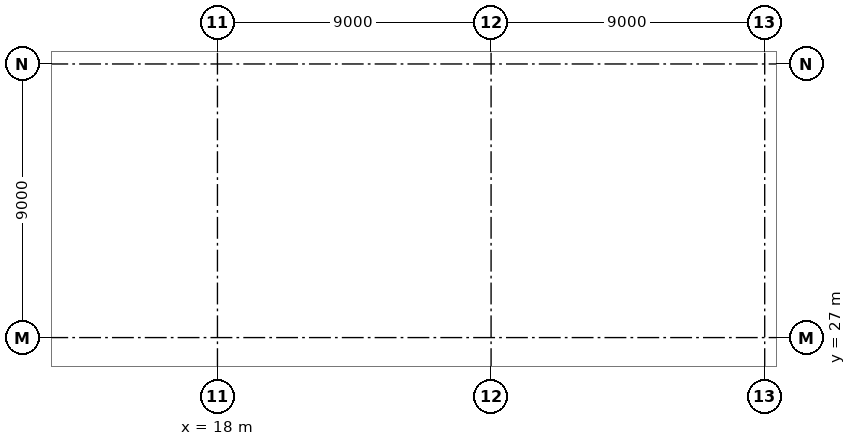
"""IFC4 building model, lengths in metres.
Left out: names, types, materials, properties, quantities, classifications, styles, units other than length and angle.
Written with IfcOpenShell. Run it as: python <this file> out.ifc"""

import sys

from ifc_helpers import new_model, si_unit, direction, frame, frame_2d, origin, origin_2d, place, context, subcontext, project, spatial, rectangle, extrude, element, fill, save


model = new_model("IFC4")
c1 = context("Model", 3, precision=1e-05, world=origin(), true_north=direction((0.0, 1.0)))
c2 = subcontext(c1, "Body", "Model", "MODEL_VIEW")
j1 = project(units=[si_unit("LENGTHUNIT", "METRE"), si_unit("PLANEANGLEUNIT", "RADIAN")], contexts=[c1])
p1 = place(None, origin())
s1 = spatial("IfcSite", under=j1, at=p1, CompositionType="ELEMENT")
p2 = place(p1, origin())
s2 = spatial("IfcBuilding", under=s1, at=p2, CompositionType="ELEMENT")
p3 = place(p2, origin())
s3 = spatial("IfcBuildingStorey", under=s2, at=p3, CompositionType="ELEMENT", Elevation=0.0)
p4 = place(p3, frame((18.0, 34.6, 0.0), z_axis=(0.0, 0.0, 1.0), x_axis=(1.0, 0.0, 0.0)))
e1 = element("IfcColumn", 1, at=p4, inside=s3, PredefinedType="COLUMN", context=c2, shape_type="SweptSolid", body=[
    extrude(rectangle(XDim=0.625, YDim=0.625, at=origin_2d()), origin(), (0.0, 0.0, 1.0), 4.5),
])
p5 = place(p3, frame((27.0, 27.0, 0.0), z_axis=(0.0, 0.0, 1.0), x_axis=(1.0, 0.0, 0.0)))
e2 = element("IfcColumn", 2, at=p5, inside=s3, PredefinedType="COLUMN", context=c2, shape_type="SweptSolid", body=[
    extrude(rectangle(XDim=0.875, YDim=0.875, at=origin_2d()), origin(), (0.0, 0.0, 1.0), 4.5),
])
p6 = place(p3, frame((27.0, 34.6, 0.0), z_axis=(0.0, 0.0, 1.0), x_axis=(1.0, 0.0, 0.0)))
e3 = element("IfcColumn", 3, at=p6, inside=s3, PredefinedType="COLUMN", context=c2, shape_type="SweptSolid", body=[
    extrude(rectangle(XDim=0.575, YDim=0.575, at=origin_2d()), origin(), (0.0, 0.0, 1.0), 4.5),
])
p7 = place(p3, frame((34.6, 27.0, 0.0), z_axis=(0.0, 0.0, 1.0), x_axis=(1.0, 0.0, 0.0)))
e4 = element("IfcColumn", 4, at=p7, inside=s3, PredefinedType="COLUMN", context=c2, shape_type="SweptSolid", body=[
    extrude(rectangle(XDim=0.6, YDim=0.6, at=origin_2d()), origin(), (0.0, 0.0, 1.0), 4.5),
])
p8 = place(p3, frame((13.45, 27.0, 0.0), z_axis=(0.0, 0.0, 1.0), x_axis=(1.0, 0.0, 0.0)))
e5 = element("IfcWall", 5, at=p8, inside=s3, PredefinedType="PARTITIONING", context=c2, shape_type="SweptSolid", body=[
    extrude(rectangle(XDim=4.625, YDim=0.1, at=frame_2d((2.312, 0.0))), origin(), (0.0, 0.0, 1.0), 4.1),
])
p9 = place(p3, frame((27.5, 27.0, 0.0), z_axis=(0.0, 0.0, 1.0), x_axis=(1.0, 0.0, 0.0)))
e6 = element("IfcWall", 6, at=p9, inside=s3, PredefinedType="PARTITIONING", context=c2, shape_type="SweptSolid", body=[
    extrude(rectangle(XDim=6.6, YDim=0.1, at=frame_2d((3.3, 0.0))), origin(), (0.0, 0.0, 1.0), 4.1),
])
p10 = place(p9, frame((3.3, 0.0, 0.0)))
e7 = element("IfcOpeningElement", 7, at=p10, cuts=e6, PredefinedType="OPENING", context=c2, shape_type="SweptSolid", body=[
    extrude(rectangle(XDim=0.9, YDim=2.1, at=frame_2d((0.45, 1.05))), frame((0.0, 0.06, 0.0), z_axis=(0.0, -1.0, 0.0), x_axis=(1.0, 0.0, 0.0)), (0.0, 0.0, 1.0), 0.12),
])
p11 = place(p9, frame((5.3, 0.0, 0.0)))
e8 = element("IfcOpeningElement", 8, at=p11, cuts=e6, PredefinedType="OPENING", context=c2, shape_type="SweptSolid", body=[
    extrude(rectangle(XDim=0.9, YDim=2.1, at=frame_2d((0.45, 1.05))), frame((0.0, 0.06, 0.0), z_axis=(0.0, -1.0, 0.0), x_axis=(1.0, 0.0, 0.0)), (0.0, 0.0, 1.0), 0.12),
])
p12 = place(p3, frame((35.1, 27.0, 0.0), z_axis=(0.0, 0.0, 1.0), x_axis=(1.0, 0.0, 0.0)))
e9 = element("IfcWall", 9, at=p12, inside=s3, PredefinedType="PARTITIONING", context=c2, shape_type="SweptSolid", body=[
    extrude(rectangle(XDim=0.9, YDim=0.1, at=frame_2d((0.45, 0.0))), origin(), (0.0, 0.0, 1.0), 4.1),
])
p13 = place(p3, frame((17.925, 31.5, 0.0), z_axis=(0.0, 0.0, 1.0), x_axis=(1.0, 0.0, 0.0)))
e10 = element("IfcWall", 10, at=p13, inside=s3, PredefinedType="PARTITIONING", context=c2, shape_type="SweptSolid", body=[
    extrude(rectangle(XDim=9.15, YDim=0.2, at=frame_2d((4.575, 0.0))), origin(), (0.0, 0.0, 1.0), 4.1),
])
p14 = place(p13, frame((7.075, 0.0, 0.0)))
e11 = element("IfcOpeningElement", 11, at=p14, cuts=e10, PredefinedType="OPENING", context=c2, shape_type="SweptSolid", body=[
    extrude(rectangle(XDim=1.2, YDim=2.1, at=frame_2d((0.6, 1.05))), frame((0.0, 0.11, 0.0), z_axis=(0.0, -1.0, 0.0), x_axis=(1.0, 0.0, 0.0)), (0.0, 0.0, 1.0), 0.22),
])
p15 = place(p3, frame((13.5, 27.05, 0.0), z_axis=(0.0, 0.0, 1.0), x_axis=(0.0, 1.0, 0.0)))
e12 = element("IfcWall", 12, at=p15, inside=s3, PredefinedType="PARTITIONING", context=c2, shape_type="SweptSolid", body=[
    extrude(rectangle(XDim=8.95, YDim=0.1, at=frame_2d((4.475, 0.0))), origin(), (0.0, 0.0, 1.0), 4.1),
])
p16 = place(p15, frame((3.55, 0.0, 0.0)))
e13 = element("IfcOpeningElement", 13, at=p16, cuts=e12, PredefinedType="OPENING", context=c2, shape_type="SweptSolid", body=[
    extrude(rectangle(XDim=1.8, YDim=2.1, at=frame_2d((0.9, 1.05))), frame((0.0, 0.06, 0.0), z_axis=(0.0, -1.0, 0.0), x_axis=(1.0, 0.0, 0.0)), (0.0, 0.0, 1.0), 0.12),
])
p17 = place(p3, frame((18.0, 27.05, 0.0), z_axis=(0.0, 0.0, 1.0), x_axis=(0.0, 1.0, 0.0)))
e14 = element("IfcWall", 14, at=p17, inside=s3, PredefinedType="PARTITIONING", context=c2, shape_type="SweptSolid", body=[
    extrude(rectangle(XDim=4.35, YDim=0.15, at=frame_2d((2.175, 0.0))), origin(), (0.0, 0.0, 1.0), 4.1),
])
p18 = place(p3, frame((18.0, 31.6, 0.0), z_axis=(0.0, 0.0, 1.0), x_axis=(0.0, 1.0, 0.0)))
e15 = element("IfcWall", 15, at=p18, inside=s3, PredefinedType="PARTITIONING", context=c2, shape_type="SweptSolid", body=[
    extrude(rectangle(XDim=2.688, YDim=0.2, at=frame_2d((1.344, 0.0))), origin(), (0.0, 0.0, 1.0), 4.1),
])
p19 = place(p3, frame((18.0, 34.913, 0.0), z_axis=(0.0, 0.0, 1.0), x_axis=(0.0, 1.0, 0.0)))
e16 = element("IfcWall", 16, at=p19, inside=s3, PredefinedType="PARTITIONING", context=c2, shape_type="SweptSolid", body=[
    extrude(rectangle(XDim=1.087, YDim=0.2, at=frame_2d((0.544, 0.0))), origin(), (0.0, 0.0, 1.0), 4.1),
])
p20 = place(p3, frame((27.0, 27.5, 0.0), z_axis=(0.0, 0.0, 1.0), x_axis=(0.0, 1.0, 0.0)))
e17 = element("IfcWall", 17, at=p20, inside=s3, PredefinedType="PARTITIONING", context=c2, shape_type="SweptSolid", body=[
    extrude(rectangle(XDim=3.9, YDim=0.15, at=frame_2d((1.95, 0.0))), origin(), (0.0, 0.0, 1.0), 4.1),
])
p21 = place(p20, frame((1.3, 0.0, 0.0)))
e18 = element("IfcOpeningElement", 18, at=p21, cuts=e17, PredefinedType="OPENING", context=c2, shape_type="SweptSolid", body=[
    extrude(rectangle(XDim=0.9, YDim=2.1, at=frame_2d((0.45, 1.05))), frame((0.0, 0.085, 0.0), z_axis=(0.0, -1.0, 0.0), x_axis=(1.0, 0.0, 0.0)), (0.0, 0.0, 1.0), 0.17),
])
p22 = place(p3, frame((27.0, 31.6, 0.0), z_axis=(0.0, 0.0, 1.0), x_axis=(0.0, 1.0, 0.0)))
e19 = element("IfcWall", 19, at=p22, inside=s3, PredefinedType="PARTITIONING", context=c2, shape_type="SweptSolid", body=[
    extrude(rectangle(XDim=2.712, YDim=0.2, at=frame_2d((1.356, 0.0))), origin(), (0.0, 0.0, 1.0), 4.1),
])
p23 = place(p3, frame((27.0, 34.887, 0.0), z_axis=(0.0, 0.0, 1.0), x_axis=(0.0, 1.0, 0.0)))
e20 = element("IfcWall", 20, at=p23, inside=s3, PredefinedType="PARTITIONING", context=c2, shape_type="SweptSolid", body=[
    extrude(rectangle(XDim=1.113, YDim=0.2, at=frame_2d((0.556, 0.0))), origin(), (0.0, 0.0, 1.0), 4.1),
])
for number, where, z_axis, x_axis in (
    (21, (30.0, 27.05, 0.0), (0.0, 0.0, 1.0), (0.0, 1.0, 0.0)),
    (22, (32.5, 27.05, 0.0), (0.0, 0.0, 1.0), (0.0, 1.0, 0.0)),
):
    element("IfcWall", number, at=place(p3, frame(where, z_axis=z_axis, x_axis=x_axis)), inside=s3, PredefinedType="PARTITIONING", context=c2, shape_type="SweptSolid", body=[
        extrude(rectangle(XDim=8.95, YDim=0.1, at=frame_2d((4.475, 0.0))), origin(), (0.0, 0.0, 1.0), 4.1),
    ])
p24 = place(p3, frame((35.7, 27.0, 0.0), z_axis=(0.0, 0.0, 1.0), x_axis=(0.0, 1.0, 0.0)))
e23 = element("IfcWall", 23, at=p24, inside=s3, PredefinedType="STANDARD", context=c2, shape_type="SweptSolid", body=[
    extrude(rectangle(XDim=3.876, YDim=0.6, at=frame_2d((1.938, 0.0))), origin(), (0.0, 0.0, 1.0), 4.1),
])
p25 = place(p24, frame((0.724, 0.0, 0.45)))
e24 = element("IfcOpeningElement", 24, at=p25, cuts=e23, PredefinedType="OPENING", context=c2, shape_type="SweptSolid", body=[
    extrude(rectangle(XDim=2.0, YDim=3.2, at=frame_2d((1.0, 1.6))), frame((0.0, 0.31, 0.0), z_axis=(0.0, -1.0, 0.0), x_axis=(1.0, 0.0, 0.0)), (0.0, 0.0, 1.0), 0.62),
])
p26 = place(p3, frame((35.7, 30.876, 0.0), z_axis=(0.0, 0.0, 1.0), x_axis=(-0.707106781187, 0.707106781187, 0.0)))
e25 = element("IfcWall", 25, at=p26, inside=s3, PredefinedType="STANDARD", context=c2, shape_type="SweptSolid", body=[
    extrude(rectangle(XDim=6.823, YDim=0.6, at=frame_2d((3.411, 0.0))), origin(), (0.0, 0.0, 1.0), 4.1),
])
p27 = place(p3, frame((30.876, 35.7, 0.0), z_axis=(0.0, 0.0, 1.0), x_axis=(-1.0, 0.0, 0.0)))
e26 = element("IfcWall", 26, at=p27, inside=s3, PredefinedType="STANDARD", context=c2, shape_type="SweptSolid", body=[
    extrude(rectangle(XDim=4.176, YDim=0.6, at=frame_2d((2.088, 0.0))), origin(), (0.0, 0.0, 1.0), 4.1),
])
p28 = place(p27, frame((1.152, 0.0, 0.45)))
e27 = element("IfcOpeningElement", 27, at=p28, cuts=e26, PredefinedType="OPENING", context=c2, shape_type="SweptSolid", body=[
    extrude(rectangle(XDim=2.0, YDim=3.2, at=frame_2d((1.0, 1.6))), frame((0.0, 0.31, 0.0), z_axis=(0.0, -1.0, 0.0), x_axis=(1.0, 0.0, 0.0)), (0.0, 0.0, 1.0), 0.62),
])
p29 = place(p3, frame((24.5, 35.7, 0.0), z_axis=(0.0, 0.0, 1.0), x_axis=(1.0, 0.0, 0.0)))
e28 = element("IfcWall", 28, at=p29, inside=s3, PredefinedType="STANDARD", context=c2, shape_type="SweptSolid", body=[
    extrude(rectangle(XDim=2.2, YDim=0.6, at=frame_2d((1.1, 0.0))), origin(), (0.0, 0.0, 1.0), 4.1),
])
p30 = place(p29, frame((0.5, 0.0, 0.0)))
e29 = element("IfcOpeningElement", 29, at=p30, cuts=e28, PredefinedType="OPENING", context=c2, shape_type="SweptSolid", body=[
    extrude(rectangle(XDim=1.2, YDim=2.4, at=frame_2d((0.6, 1.2))), frame((0.0, 0.31, 0.0), z_axis=(0.0, -1.0, 0.0), x_axis=(1.0, 0.0, 0.0)), (0.0, 0.0, 1.0), 0.62),
])
p31 = place(p3, frame((24.5, 35.7, 0.0), z_axis=(0.0, 0.0, 1.0), x_axis=(-1.0, 0.0, 0.0)))
e30 = element("IfcWall", 30, at=p31, inside=s3, PredefinedType="STANDARD", context=c2, shape_type="SweptSolid", body=[
    extrude(rectangle(XDim=49.0, YDim=0.6, at=frame_2d((24.5, 0.0))), origin(), (0.0, 0.0, 1.0), 4.1),
])
p32 = place(p31, frame((3.571, 0.0, 0.45)))
e31 = element("IfcOpeningElement", 31, at=p32, cuts=e30, PredefinedType="OPENING", context=c2, shape_type="SweptSolid", body=[
    extrude(rectangle(XDim=2.0, YDim=3.2, at=frame_2d((1.0, 1.6))), frame((0.0, 0.31, 0.0), z_axis=(0.0, -1.0, 0.0), x_axis=(1.0, 0.0, 0.0)), (0.0, 0.0, 1.0), 0.62),
])
p33 = place(p31, frame((8.0, 0.0, 0.45)))
e32 = element("IfcOpeningElement", 32, at=p33, cuts=e30, PredefinedType="OPENING", context=c2, shape_type="SweptSolid", body=[
    extrude(rectangle(XDim=2.0, YDim=3.2, at=frame_2d((1.0, 1.6))), frame((0.0, 0.31, 0.0), z_axis=(0.0, -1.0, 0.0), x_axis=(1.0, 0.0, 0.0)), (0.0, 0.0, 1.0), 0.62),
])
p34 = place(p31, frame((12.429, 0.0, 0.45)))
e33 = element("IfcOpeningElement", 33, at=p34, cuts=e30, PredefinedType="OPENING", context=c2, shape_type="SweptSolid", body=[
    extrude(rectangle(XDim=2.0, YDim=3.2, at=frame_2d((1.0, 1.6))), frame((0.0, 0.31, 0.0), z_axis=(0.0, -1.0, 0.0), x_axis=(1.0, 0.0, 0.0)), (0.0, 0.0, 1.0), 0.62),
])
p35 = place(p31, frame((16.857, 0.0, 0.45)))
e34 = element("IfcOpeningElement", 34, at=p35, cuts=e30, PredefinedType="OPENING", context=c2, shape_type="SweptSolid", body=[
    extrude(rectangle(XDim=2.0, YDim=3.2, at=frame_2d((1.0, 1.6))), frame((0.0, 0.31, 0.0), z_axis=(0.0, -1.0, 0.0), x_axis=(1.0, 0.0, 0.0)), (0.0, 0.0, 1.0), 0.62),
])
p36 = place(p31, frame((21.286, 0.0, 0.45)))
e35 = element("IfcOpeningElement", 35, at=p36, cuts=e30, PredefinedType="OPENING", context=c2, shape_type="SweptSolid", body=[
    extrude(rectangle(XDim=2.0, YDim=3.2, at=frame_2d((1.0, 1.6))), frame((0.0, 0.31, 0.0), z_axis=(0.0, -1.0, 0.0), x_axis=(1.0, 0.0, 0.0)), (0.0, 0.0, 1.0), 0.62),
])
p37 = place(p31, frame((25.714, 0.0, 0.45)))
e36 = element("IfcOpeningElement", 36, at=p37, cuts=e30, PredefinedType="OPENING", context=c2, shape_type="SweptSolid", body=[
    extrude(rectangle(XDim=2.0, YDim=3.2, at=frame_2d((1.0, 1.6))), frame((0.0, 0.31, 0.0), z_axis=(0.0, -1.0, 0.0), x_axis=(1.0, 0.0, 0.0)), (0.0, 0.0, 1.0), 0.62),
])
p38 = place(p31, frame((30.143, 0.0, 0.45)))
e37 = element("IfcOpeningElement", 37, at=p38, cuts=e30, PredefinedType="OPENING", context=c2, shape_type="SweptSolid", body=[
    extrude(rectangle(XDim=2.0, YDim=3.2, at=frame_2d((1.0, 1.6))), frame((0.0, 0.31, 0.0), z_axis=(0.0, -1.0, 0.0), x_axis=(1.0, 0.0, 0.0)), (0.0, 0.0, 1.0), 0.62),
])
p39 = place(p31, frame((34.571, 0.0, 0.45)))
e38 = element("IfcOpeningElement", 38, at=p39, cuts=e30, PredefinedType="OPENING", context=c2, shape_type="SweptSolid", body=[
    extrude(rectangle(XDim=2.0, YDim=3.2, at=frame_2d((1.0, 1.6))), frame((0.0, 0.31, 0.0), z_axis=(0.0, -1.0, 0.0), x_axis=(1.0, 0.0, 0.0)), (0.0, 0.0, 1.0), 0.62),
])
p40 = place(p31, frame((39.0, 0.0, 0.45)))
e39 = element("IfcOpeningElement", 39, at=p40, cuts=e30, PredefinedType="OPENING", context=c2, shape_type="SweptSolid", body=[
    extrude(rectangle(XDim=2.0, YDim=3.2, at=frame_2d((1.0, 1.6))), frame((0.0, 0.31, 0.0), z_axis=(0.0, -1.0, 0.0), x_axis=(1.0, 0.0, 0.0)), (0.0, 0.0, 1.0), 0.62),
])
p41 = place(p31, frame((43.429, 0.0, 0.45)))
e40 = element("IfcOpeningElement", 40, at=p41, cuts=e30, PredefinedType="OPENING", context=c2, shape_type="SweptSolid", body=[
    extrude(rectangle(XDim=2.0, YDim=3.2, at=frame_2d((1.0, 1.6))), frame((0.0, 0.31, 0.0), z_axis=(0.0, -1.0, 0.0), x_axis=(1.0, 0.0, 0.0)), (0.0, 0.0, 1.0), 0.62),
])
p42 = place(p14, frame((1.2, 0.0, 0.0), z_axis=(0.0, 0.0, 1.0), x_axis=(-1.0, 0.0, 0.0)))
e41 = element("IfcDoor", 41, at=p42, inside=s3, OperationType="SINGLE_SWING_RIGHT", PredefinedType="DOOR", context=c2, shape_type="SweptSolid", body=[
    extrude(rectangle(XDim=1.2, YDim=2.1, at=frame_2d((0.6, 1.05))), frame((0.0, 0.025, 0.0), z_axis=(0.0, -1.0, 0.0), x_axis=(1.0, 0.0, 0.0)), (0.0, 0.0, 1.0), 0.05),
])
fill(e11, e41)
p43 = place(p21, origin())
e42 = element("IfcDoor", 42, at=p43, inside=s3, OperationType="SINGLE_SWING_LEFT", PredefinedType="DOOR", context=c2, shape_type="SweptSolid", body=[
    extrude(rectangle(XDim=0.9, YDim=2.1, at=frame_2d((0.45, 1.05))), frame((0.0, 0.025, 0.0), z_axis=(0.0, -1.0, 0.0), x_axis=(1.0, 0.0, 0.0)), (0.0, 0.0, 1.0), 0.05),
])
fill(e18, e42)
p44 = place(p10, origin())
e43 = element("IfcDoor", 43, at=p44, inside=s3, OperationType="SINGLE_SWING_RIGHT", PredefinedType="DOOR", context=c2, shape_type="SweptSolid", body=[
    extrude(rectangle(XDim=0.9, YDim=2.1, at=frame_2d((0.45, 1.05))), frame((0.0, 0.025, 0.0), z_axis=(0.0, -1.0, 0.0), x_axis=(1.0, 0.0, 0.0)), (0.0, 0.0, 1.0), 0.05),
])
fill(e7, e43)
p45 = place(p11, origin())
e44 = element("IfcDoor", 44, at=p45, inside=s3, OperationType="SINGLE_SWING_LEFT", PredefinedType="DOOR", context=c2, shape_type="SweptSolid", body=[
    extrude(rectangle(XDim=0.9, YDim=2.1, at=frame_2d((0.45, 1.05))), frame((0.0, 0.025, 0.0), z_axis=(0.0, -1.0, 0.0), x_axis=(1.0, 0.0, 0.0)), (0.0, 0.0, 1.0), 0.05),
])
fill(e8, e44)
p46 = place(p16, origin())
e45 = element("IfcDoor", 45, at=p46, inside=s3, OperationType="DOUBLE_DOOR_SINGLE_SWING", PredefinedType="DOOR", context=c2, shape_type="SweptSolid", body=[
    extrude(rectangle(XDim=1.8, YDim=2.1, at=frame_2d((0.9, 1.05))), frame((0.0, 0.025, 0.0), z_axis=(0.0, -1.0, 0.0), x_axis=(1.0, 0.0, 0.0)), (0.0, 0.0, 1.0), 0.05),
])
fill(e13, e45)
p47 = place(p25, origin())
e46 = element("IfcWindow", 46, at=p47, inside=s3, PartitioningType="SINGLE_PANEL", PredefinedType="WINDOW", context=c2, shape_type="SweptSolid", body=[
    extrude(rectangle(XDim=2.0, YDim=3.2, at=frame_2d((1.0, 1.6))), frame((0.0, 0.03, 0.0), z_axis=(0.0, -1.0, 0.0), x_axis=(1.0, 0.0, 0.0)), (0.0, 0.0, 1.0), 0.06),
])
fill(e24, e46)
p48 = place(p28, origin())
e47 = element("IfcWindow", 47, at=p48, inside=s3, PartitioningType="SINGLE_PANEL", PredefinedType="WINDOW", context=c2, shape_type="SweptSolid", body=[
    extrude(rectangle(XDim=2.0, YDim=3.2, at=frame_2d((1.0, 1.6))), frame((0.0, 0.03, 0.0), z_axis=(0.0, -1.0, 0.0), x_axis=(1.0, 0.0, 0.0)), (0.0, 0.0, 1.0), 0.06),
])
fill(e27, e47)
p49 = place(p30, origin())
e48 = element("IfcDoor", 48, at=p49, inside=s3, OperationType="SINGLE_SWING_LEFT", PredefinedType="DOOR", context=c2, shape_type="SweptSolid", body=[
    extrude(rectangle(XDim=1.2, YDim=2.4, at=frame_2d((0.6, 1.2))), frame((0.0, 0.025, 0.0), z_axis=(0.0, -1.0, 0.0), x_axis=(1.0, 0.0, 0.0)), (0.0, 0.0, 1.0), 0.05),
])
fill(e29, e48)
p50 = place(p32, origin())
e49 = element("IfcWindow", 49, at=p50, inside=s3, PartitioningType="SINGLE_PANEL", PredefinedType="WINDOW", context=c2, shape_type="SweptSolid", body=[
    extrude(rectangle(XDim=2.0, YDim=3.2, at=frame_2d((1.0, 1.6))), frame((0.0, 0.03, 0.0), z_axis=(0.0, -1.0, 0.0), x_axis=(1.0, 0.0, 0.0)), (0.0, 0.0, 1.0), 0.06),
])
fill(e31, e49)
p51 = place(p33, origin())
e50 = element("IfcWindow", 50, at=p51, inside=s3, PartitioningType="SINGLE_PANEL", PredefinedType="WINDOW", context=c2, shape_type="SweptSolid", body=[
    extrude(rectangle(XDim=2.0, YDim=3.2, at=frame_2d((1.0, 1.6))), frame((0.0, 0.03, 0.0), z_axis=(0.0, -1.0, 0.0), x_axis=(1.0, 0.0, 0.0)), (0.0, 0.0, 1.0), 0.06),
])
fill(e32, e50)
save(model, sys.argv[1])
